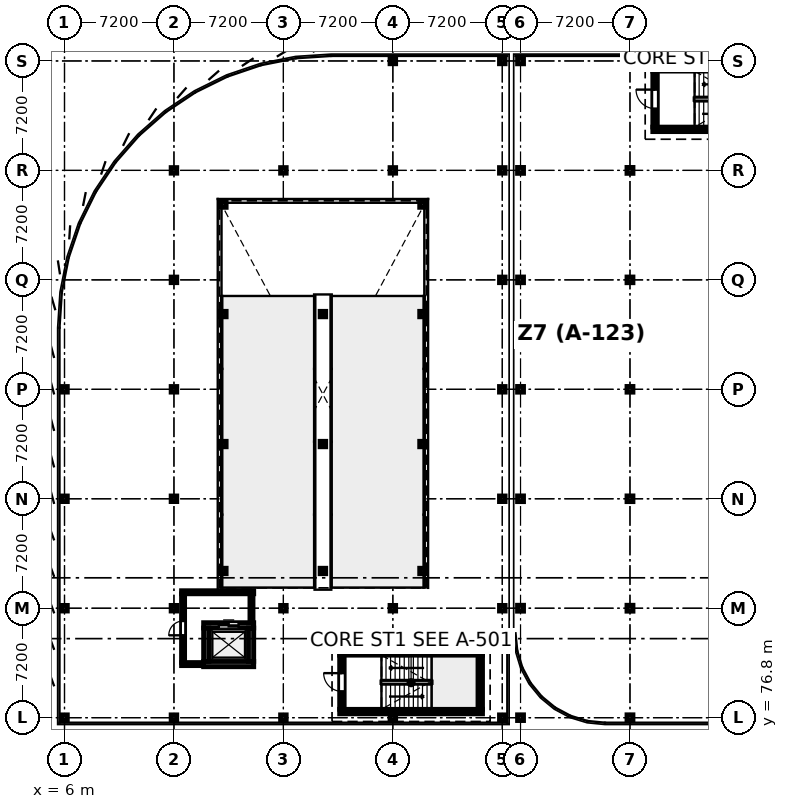
"""IFC4 building model, lengths in metres.
Left out: names, types, materials, properties, quantities, classifications, styles, units other than length and angle.
Written with IfcOpenShell. Run it as: python <this file> out.ifc"""

import sys

from ifc_helpers import new_model, si_unit, direction, frame, frame_2d, origin, origin_2d, place, context, subcontext, project, spatial, rectangle, i_section, extrude, element, fill, save


model = new_model("IFC4")
c1 = context("Model", 3, precision=1e-05, world=origin(), true_north=direction((0.0, 1.0)))
c2 = subcontext(c1, "Body", "Model", "MODEL_VIEW")
j1 = project(units=[si_unit("LENGTHUNIT", "METRE"), si_unit("PLANEANGLEUNIT", "RADIAN")], contexts=[c1])
p1 = place(None, origin())
s1 = spatial("IfcSite", under=j1, at=p1, CompositionType="ELEMENT")
p2 = place(p1, origin())
s2 = spatial("IfcBuilding", under=s1, at=p2, CompositionType="ELEMENT")
p3 = place(p2, frame((0.0, 0.0, 5.4)))
s3 = spatial("IfcBuildingStorey", under=s2, at=p3, CompositionType="ELEMENT", Elevation=5.4)
for number, where, z_axis, x_axis in (
    (1, (6.0, 76.8, 0.0), (0.0, 0.0, 1.0), (1.0, 0.0, 0.0)),
    (2, (6.0, 84.0, 0.0), (0.0, 0.0, 1.0), (1.0, 0.0, 0.0)),
    (3, (6.0, 91.2, 0.0), (0.0, 0.0, 1.0), (1.0, 0.0, 0.0)),
    (4, (6.0, 98.4, 0.0), (0.0, 0.0, 1.0), (1.0, 0.0, 0.0)),
    (5, (13.2, 76.8, 0.0), (0.0, 0.0, 1.0), (1.0, 0.0, 0.0)),
    (6, (13.2, 84.0, 0.0), (0.0, 0.0, 1.0), (1.0, 0.0, 0.0)),
    (7, (13.2, 91.2, 0.0), (0.0, 0.0, 1.0), (1.0, 0.0, 0.0)),
    (8, (13.2, 98.4, 0.0), (0.0, 0.0, 1.0), (1.0, 0.0, 0.0)),
    (9, (13.2, 105.6, 0.0), (0.0, 0.0, 1.0), (1.0, 0.0, 0.0)),
    (10, (13.2, 112.8, 0.0), (0.0, 0.0, 1.0), (1.0, 0.0, 0.0)),
    (11, (20.4, 76.8, 0.0), (0.0, 0.0, 1.0), (1.0, 0.0, 0.0)),
    (12, (20.4, 84.0, 0.0), (0.0, 0.0, 1.0), (1.0, 0.0, 0.0)),
    (13, (20.4, 112.8, 0.0), (0.0, 0.0, 1.0), (1.0, 0.0, 0.0)),
    (14, (27.6, 76.8, 0.0), (0.0, 0.0, 1.0), (1.0, 0.0, 0.0)),
    (15, (27.6, 84.0, 0.0), (0.0, 0.0, 1.0), (1.0, 0.0, 0.0)),
    (16, (27.6, 112.8, 0.0), (0.0, 0.0, 1.0), (1.0, 0.0, 0.0)),
    (17, (27.6, 120.0, 0.0), (0.0, 0.0, 1.0), (1.0, 0.0, 0.0)),
    (18, (34.8, 76.8, 0.0), (0.0, 0.0, 1.0), (1.0, 0.0, 0.0)),
    (19, (34.8, 84.0, 0.0), (0.0, 0.0, 1.0), (1.0, 0.0, 0.0)),
    (20, (34.8, 91.2, 0.0), (0.0, 0.0, 1.0), (1.0, 0.0, 0.0)),
    (21, (34.8, 98.4, 0.0), (0.0, 0.0, 1.0), (1.0, 0.0, 0.0)),
    (22, (34.8, 105.6, 0.0), (0.0, 0.0, 1.0), (1.0, 0.0, 0.0)),
    (23, (34.8, 112.8, 0.0), (0.0, 0.0, 1.0), (1.0, 0.0, 0.0)),
    (24, (34.8, 120.0, 0.0), (0.0, 0.0, 1.0), (1.0, 0.0, 0.0)),
):
    element("IfcColumn", number, at=place(p3, frame(where, z_axis=z_axis, x_axis=x_axis)), inside=s3, PredefinedType="COLUMN", context=c2, shape_type="SweptSolid", body=[
        extrude(i_section(OverallWidth=0.373, OverallDepth=0.373, WebThickness=0.016, FlangeThickness=0.026, FilletRadius=0.015, at=origin_2d()), origin(), (0.0, 0.0, 1.0), 3.9),
    ])
for number, where, z_axis, x_axis in (
    (25, (16.45, 86.45, 0.0), (0.0, 0.0, 1.0), (1.0, 0.0, 0.0)),
    (26, (23.0, 86.45, 0.0), (0.0, 0.0, 1.0), (1.0, 0.0, 0.0)),
    (27, (29.55, 86.45, 0.0), (0.0, 0.0, 1.0), (1.0, 0.0, 0.0)),
    (28, (16.45, 94.8, 0.0), (0.0, 0.0, 1.0), (1.0, 0.0, 0.0)),
    (29, (23.0, 94.8, 0.0), (0.0, 0.0, 1.0), (1.0, 0.0, 0.0)),
    (30, (29.55, 94.8, 0.0), (0.0, 0.0, 1.0), (1.0, 0.0, 0.0)),
    (31, (16.45, 103.35, 0.0), (0.0, 0.0, 1.0), (1.0, 0.0, 0.0)),
    (32, (23.0, 103.35, 0.0), (0.0, 0.0, 1.0), (1.0, 0.0, 0.0)),
    (33, (29.55, 103.35, 0.0), (0.0, 0.0, 1.0), (1.0, 0.0, 0.0)),
    (34, (16.45, 110.55, 0.0), (0.0, 0.0, 1.0), (1.0, 0.0, 0.0)),
    (35, (29.55, 110.55, 0.0), (0.0, 0.0, 1.0), (1.0, 0.0, 0.0)),
):
    element("IfcColumn", number, at=place(p3, frame(where, z_axis=z_axis, x_axis=x_axis)), inside=s3, PredefinedType="COLUMN", context=c2, shape_type="SweptSolid", body=[
        extrude(i_section(OverallWidth=0.371, OverallDepth=0.363, WebThickness=0.013, FlangeThickness=0.022, FilletRadius=0.015, at=origin_2d()), origin(), (0.0, 0.0, 1.0), 3.9),
    ])
p4 = place(p3, frame((36.0, 76.8, 0.0), z_axis=(0.0, 0.0, 1.0), x_axis=(1.0, 0.0, 0.0)))
e36 = element("IfcColumn", 36, at=p4, inside=s3, PredefinedType="COLUMN", context=c2, shape_type="SweptSolid", body=[
    extrude(i_section(OverallWidth=0.396, OverallDepth=0.381, WebThickness=0.019, FlangeThickness=0.03, FilletRadius=0.015, at=origin_2d()), origin(), (0.0, 0.0, 1.0), 3.9),
])
p5 = place(p3, frame((36.0, 84.0, 0.0), z_axis=(0.0, 0.0, 1.0), x_axis=(1.0, 0.0, 0.0)))
e37 = element("IfcColumn", 37, at=p5, inside=s3, PredefinedType="COLUMN", context=c2, shape_type="SweptSolid", body=[
    extrude(i_section(OverallWidth=0.399, OverallDepth=0.394, WebThickness=0.023, FlangeThickness=0.037, FilletRadius=0.015, at=origin_2d()), origin(), (0.0, 0.0, 1.0), 3.9),
])
for number, where, z_axis, x_axis in (
    (38, (36.0, 91.2, 0.0), (0.0, 0.0, 1.0), (1.0, 0.0, 0.0)),
    (39, (36.0, 98.4, 0.0), (0.0, 0.0, 1.0), (1.0, 0.0, 0.0)),
    (40, (36.0, 105.6, 0.0), (0.0, 0.0, 1.0), (1.0, 0.0, 0.0)),
):
    element("IfcColumn", number, at=place(p3, frame(where, z_axis=z_axis, x_axis=x_axis)), inside=s3, PredefinedType="COLUMN", context=c2, shape_type="SweptSolid", body=[
        extrude(i_section(OverallWidth=0.396, OverallDepth=0.381, WebThickness=0.019, FlangeThickness=0.03, FilletRadius=0.015, at=origin_2d()), origin(), (0.0, 0.0, 1.0), 3.9),
    ])
p6 = place(p3, frame((36.0, 112.8, 0.0), z_axis=(0.0, 0.0, 1.0), x_axis=(1.0, 0.0, 0.0)))
e41 = element("IfcColumn", 41, at=p6, inside=s3, PredefinedType="COLUMN", context=c2, shape_type="SweptSolid", body=[
    extrude(i_section(OverallWidth=0.399, OverallDepth=0.394, WebThickness=0.023, FlangeThickness=0.037, FilletRadius=0.015, at=origin_2d()), origin(), (0.0, 0.0, 1.0), 3.9),
])
for number, where, z_axis, x_axis in (
    (42, (36.0, 120.0, 0.0), (0.0, 0.0, 1.0), (1.0, 0.0, 0.0)),
    (43, (43.2, 76.8, 0.0), (0.0, 0.0, 1.0), (1.0, 0.0, 0.0)),
):
    element("IfcColumn", number, at=place(p3, frame(where, z_axis=z_axis, x_axis=x_axis)), inside=s3, PredefinedType="COLUMN", context=c2, shape_type="SweptSolid", body=[
        extrude(i_section(OverallWidth=0.396, OverallDepth=0.381, WebThickness=0.019, FlangeThickness=0.03, FilletRadius=0.015, at=origin_2d()), origin(), (0.0, 0.0, 1.0), 3.9),
    ])
p7 = place(p3, frame((43.2, 84.0, 0.0), z_axis=(0.0, 0.0, 1.0), x_axis=(1.0, 0.0, 0.0)))
e44 = element("IfcColumn", 44, at=p7, inside=s3, PredefinedType="COLUMN", context=c2, shape_type="SweptSolid", body=[
    extrude(i_section(OverallWidth=0.399, OverallDepth=0.394, WebThickness=0.023, FlangeThickness=0.037, FilletRadius=0.015, at=origin_2d()), origin(), (0.0, 0.0, 1.0), 3.9),
])
for number, where, z_axis, x_axis in (
    (45, (43.2, 91.2, 0.0), (0.0, 0.0, 1.0), (1.0, 0.0, 0.0)),
    (46, (43.2, 98.4, 0.0), (0.0, 0.0, 1.0), (1.0, 0.0, 0.0)),
    (47, (43.2, 105.6, 0.0), (0.0, 0.0, 1.0), (1.0, 0.0, 0.0)),
):
    element("IfcColumn", number, at=place(p3, frame(where, z_axis=z_axis, x_axis=x_axis)), inside=s3, PredefinedType="COLUMN", context=c2, shape_type="SweptSolid", body=[
        extrude(i_section(OverallWidth=0.396, OverallDepth=0.381, WebThickness=0.019, FlangeThickness=0.03, FilletRadius=0.015, at=origin_2d()), origin(), (0.0, 0.0, 1.0), 3.9),
    ])
p8 = place(p3, frame((43.2, 112.8, 0.0), z_axis=(0.0, 0.0, 1.0), x_axis=(1.0, 0.0, 0.0)))
e48 = element("IfcColumn", 48, at=p8, inside=s3, PredefinedType="COLUMN", context=c2, shape_type="SweptSolid", body=[
    extrude(i_section(OverallWidth=0.399, OverallDepth=0.394, WebThickness=0.023, FlangeThickness=0.037, FilletRadius=0.015, at=origin_2d()), origin(), (0.0, 0.0, 1.0), 3.9),
])
p9 = place(p3, frame((43.2, 120.0, 0.0), z_axis=(0.0, 0.0, 1.0), x_axis=(1.0, 0.0, 0.0)))
e49 = element("IfcColumn", 49, at=p9, inside=s3, PredefinedType="COLUMN", context=c2, shape_type="SweptSolid", body=[
    extrude(i_section(OverallWidth=0.396, OverallDepth=0.381, WebThickness=0.019, FlangeThickness=0.03, FilletRadius=0.015, at=origin_2d()), origin(), (0.0, 0.0, 1.0), 3.9),
])
for number, where, z_axis, x_axis in (
    (50, (33.5, 77.2, 0.0), (0.0, 0.0, 1.0), (-1.0, 0.0, 0.0)),
    (51, (24.1, 81.06, 0.0), (0.0, 0.0, 1.0), (1.0, 0.0, 0.0)),
):
    element("IfcWall", number, at=place(p3, frame(where, z_axis=z_axis, x_axis=x_axis)), inside=s3, PredefinedType="SOLIDWALL", context=c2, shape_type="SweptSolid", body=[
        extrude(rectangle(XDim=9.4, YDim=0.3, at=frame_2d((4.7, 0.0))), origin(), (0.0, 0.0, 1.0), 3.65),
    ])
p10 = place(p3, frame((24.25, 77.35, 0.0), z_axis=(0.0, 0.0, 1.0), x_axis=(0.0, 1.0, 0.0)))
e52 = element("IfcWall", 52, at=p10, inside=s3, PredefinedType="SOLIDWALL", context=c2, shape_type="SweptSolid", body=[
    extrude(rectangle(XDim=3.56, YDim=0.3, at=frame_2d((1.78, 0.0))), origin(), (0.0, 0.0, 1.0), 3.65),
])
p11 = place(p10, frame((1.18, 0.0, 0.0)))
e53 = element("IfcOpeningElement", 53, at=p11, cuts=e52, PredefinedType="OPENING", context=c2, shape_type="SweptSolid", body=[
    extrude(rectangle(XDim=1.2, YDim=2.2, at=frame_2d((0.6, 1.1))), frame((0.0, 0.16, 0.0), z_axis=(0.0, -1.0, 0.0), x_axis=(1.0, 0.0, 0.0)), (0.0, 0.0, 1.0), 0.32),
])
p12 = place(p3, frame((33.35, 80.91, 0.0), z_axis=(0.0, 0.0, 1.0), x_axis=(0.0, -1.0, 0.0)))
e54 = element("IfcWall", 54, at=p12, inside=s3, PredefinedType="SOLIDWALL", context=c2, shape_type="SweptSolid", body=[
    extrude(rectangle(XDim=3.56, YDim=0.3, at=frame_2d((1.78, 0.0))), origin(), (0.0, 0.0, 1.0), 3.65),
])
for number, where, z_axis, x_axis in (
    (55, (54.1, 115.5, 0.0), (0.0, 0.0, 1.0), (-1.0, 0.0, 0.0)),
    (56, (44.7, 119.48, 0.0), (0.0, 0.0, 1.0), (1.0, 0.0, 0.0)),
):
    element("IfcWall", number, at=place(p3, frame(where, z_axis=z_axis, x_axis=x_axis)), inside=s3, PredefinedType="SOLIDWALL", context=c2, shape_type="SweptSolid", body=[
        extrude(rectangle(XDim=9.4, YDim=0.3, at=frame_2d((4.7, 0.0))), origin(), (0.0, 0.0, 1.0), 3.67),
    ])
p13 = place(p3, frame((44.85, 115.65, 0.0), z_axis=(0.0, 0.0, 1.0), x_axis=(0.0, 1.0, 0.0)))
e57 = element("IfcWall", 57, at=p13, inside=s3, PredefinedType="SOLIDWALL", context=c2, shape_type="SweptSolid", body=[
    extrude(rectangle(XDim=3.68, YDim=0.3, at=frame_2d((1.84, 0.0))), origin(), (0.0, 0.0, 1.0), 3.67),
])
p14 = place(p13, frame((1.215, 0.0, 0.0)))
e58 = element("IfcOpeningElement", 58, at=p14, cuts=e57, PredefinedType="OPENING", context=c2, shape_type="SweptSolid", body=[
    extrude(rectangle(XDim=1.25, YDim=2.2, at=frame_2d((0.625, 1.1))), frame((0.0, 0.16, 0.0), z_axis=(0.0, -1.0, 0.0), x_axis=(1.0, 0.0, 0.0)), (0.0, 0.0, 1.0), 0.32),
])
p15 = place(p3, frame((18.45, 80.325, 0.0), z_axis=(0.0, 0.0, 1.0), x_axis=(-1.0, 0.0, 0.0)))
e59 = element("IfcWall", 59, at=p15, inside=s3, PredefinedType="SHEAR", context=c2, shape_type="SweptSolid", body=[
    extrude(rectangle(XDim=3.3, YDim=0.35, at=frame_2d((1.65, 0.0))), origin(), (0.0, 0.0, 1.0), 3.65),
])
p16 = place(p3, frame((15.15, 82.875, 0.0), z_axis=(0.0, 0.0, 1.0), x_axis=(1.0, 0.0, 0.0)))
e60 = element("IfcWall", 60, at=p16, inside=s3, PredefinedType="SHEAR", context=c2, shape_type="SweptSolid", body=[
    extrude(rectangle(XDim=3.3, YDim=0.35, at=frame_2d((1.65, 0.0))), origin(), (0.0, 0.0, 1.0), 3.65),
])
p17 = place(p16, frame((1.0, 0.0, 0.0)))
e61 = element("IfcOpeningElement", 61, at=p17, cuts=e60, PredefinedType="OPENING", context=c2, shape_type="SweptSolid", body=[
    extrude(rectangle(XDim=1.3, YDim=2.2, at=frame_2d((0.65, 1.1))), frame((0.0, 0.185, 0.0), z_axis=(0.0, -1.0, 0.0), x_axis=(1.0, 0.0, 0.0)), (0.0, 0.0, 1.0), 0.37),
])
for number, where, z_axis, x_axis in (
    (62, (15.325, 80.5, 0.0), (0.0, 0.0, 1.0), (0.0, 1.0, 0.0)),
    (63, (18.275, 82.7, 0.0), (0.0, 0.0, 1.0), (0.0, -1.0, 0.0)),
):
    element("IfcWall", number, at=place(p3, frame(where, z_axis=z_axis, x_axis=x_axis)), inside=s3, PredefinedType="SHEAR", context=c2, shape_type="SweptSolid", body=[
        extrude(rectangle(XDim=2.2, YDim=0.35, at=frame_2d((1.1, 0.0))), origin(), (0.0, 0.0, 1.0), 3.65),
    ])
p18 = place(p3, frame((13.698, 85.05, 0.0), z_axis=(0.0, 0.0, 1.0), x_axis=(1.0, 0.0, 0.0)))
e64 = element("IfcWall", 64, at=p18, inside=s3, PredefinedType="PARTITIONING", context=c2, shape_type="SweptSolid", body=[
    extrude(rectangle(XDim=4.752, YDim=0.205, at=frame_2d((2.376, 0.0))), origin(), (0.0, 0.0, 1.0), 3.018),
])
p19 = place(p3, frame((15.148, 80.325, 0.0), z_axis=(0.0, 0.0, 1.0), x_axis=(-1.0, 0.0, 0.0)))
e65 = element("IfcWall", 65, at=p19, inside=s3, PredefinedType="PARTITIONING", context=c2, shape_type="SweptSolid", body=[
    extrude(rectangle(XDim=1.45, YDim=0.205, at=frame_2d((0.725, 0.0))), origin(), (0.0, 0.0, 1.0), 3.018),
])
p20 = place(p3, frame((13.8, 80.43, 0.0), z_axis=(0.0, 0.0, 1.0), x_axis=(0.0, 1.0, 0.0)))
e66 = element("IfcWall", 66, at=p20, inside=s3, PredefinedType="PARTITIONING", context=c2, shape_type="SweptSolid", body=[
    extrude(rectangle(XDim=4.516, YDim=0.205, at=frame_2d((2.258, 0.0))), origin(), (0.0, 0.0, 1.0), 3.018),
])
p21 = place(p20, frame((1.788, 0.0, 0.0)))
e67 = element("IfcOpeningElement", 67, at=p21, cuts=e66, PredefinedType="OPENING", context=c2, shape_type="SweptSolid", body=[
    extrude(rectangle(XDim=0.94, YDim=2.1, at=frame_2d((0.47, 1.05))), frame((0.0, 0.113, 0.0), z_axis=(0.0, -1.0, 0.0), x_axis=(1.0, 0.0, 0.0)), (0.0, 0.0, 1.0), 0.225),
])
p22 = place(p3, frame((18.3, 84.946, 0.0), z_axis=(0.0, 0.0, 1.0), x_axis=(0.0, -1.0, 0.0)))
e68 = element("IfcWall", 68, at=p22, inside=s3, PredefinedType="PARTITIONING", context=c2, shape_type="SweptSolid", body=[
    extrude(rectangle(XDim=1.894, YDim=0.205, at=frame_2d((0.947, 0.0))), origin(), (0.0, 0.0, 1.0), 3.018),
])
p23 = place(p11, origin())
e69 = element("IfcDoor", 69, at=p23, inside=s3, OperationType="SINGLE_SWING_RIGHT", PredefinedType="DOOR", context=c2, shape_type="SweptSolid", body=[
    extrude(rectangle(XDim=1.2, YDim=2.2, at=frame_2d((0.6, 1.1))), frame((0.0, 0.025, 0.0), z_axis=(0.0, -1.0, 0.0), x_axis=(1.0, 0.0, 0.0)), (0.0, 0.0, 1.0), 0.05),
])
fill(e53, e69)
p24 = place(p14, origin())
e70 = element("IfcDoor", 70, at=p24, inside=s3, OperationType="SINGLE_SWING_RIGHT", PredefinedType="DOOR", context=c2, shape_type="SweptSolid", body=[
    extrude(rectangle(XDim=1.25, YDim=2.2, at=frame_2d((0.625, 1.1))), frame((0.0, 0.025, 0.0), z_axis=(0.0, -1.0, 0.0), x_axis=(1.0, 0.0, 0.0)), (0.0, 0.0, 1.0), 0.05),
])
fill(e58, e70)
p25 = place(p17, origin())
e71 = element("IfcDoor", 71, at=p25, inside=s3, OperationType="DOUBLE_DOOR_SLIDING", PredefinedType="DOOR", context=c2, shape_type="SweptSolid", body=[
    extrude(rectangle(XDim=1.3, YDim=2.2, at=frame_2d((0.65, 1.1))), frame((0.0, 0.025, 0.0), z_axis=(0.0, -1.0, 0.0), x_axis=(1.0, 0.0, 0.0)), (0.0, 0.0, 1.0), 0.05),
])
fill(e61, e71)
p26 = place(p21, origin())
e72 = element("IfcDoor", 72, at=p26, inside=s3, OperationType="SINGLE_SWING_LEFT", PredefinedType="DOOR", context=c2, shape_type="SweptSolid", body=[
    extrude(rectangle(XDim=0.94, YDim=2.1, at=frame_2d((0.47, 1.05))), frame((0.0, 0.025, 0.0), z_axis=(0.0, -1.0, 0.0), x_axis=(1.0, 0.0, 0.0)), (0.0, 0.0, 1.0), 0.05),
])
fill(e67, e72)
save(model, sys.argv[1])
